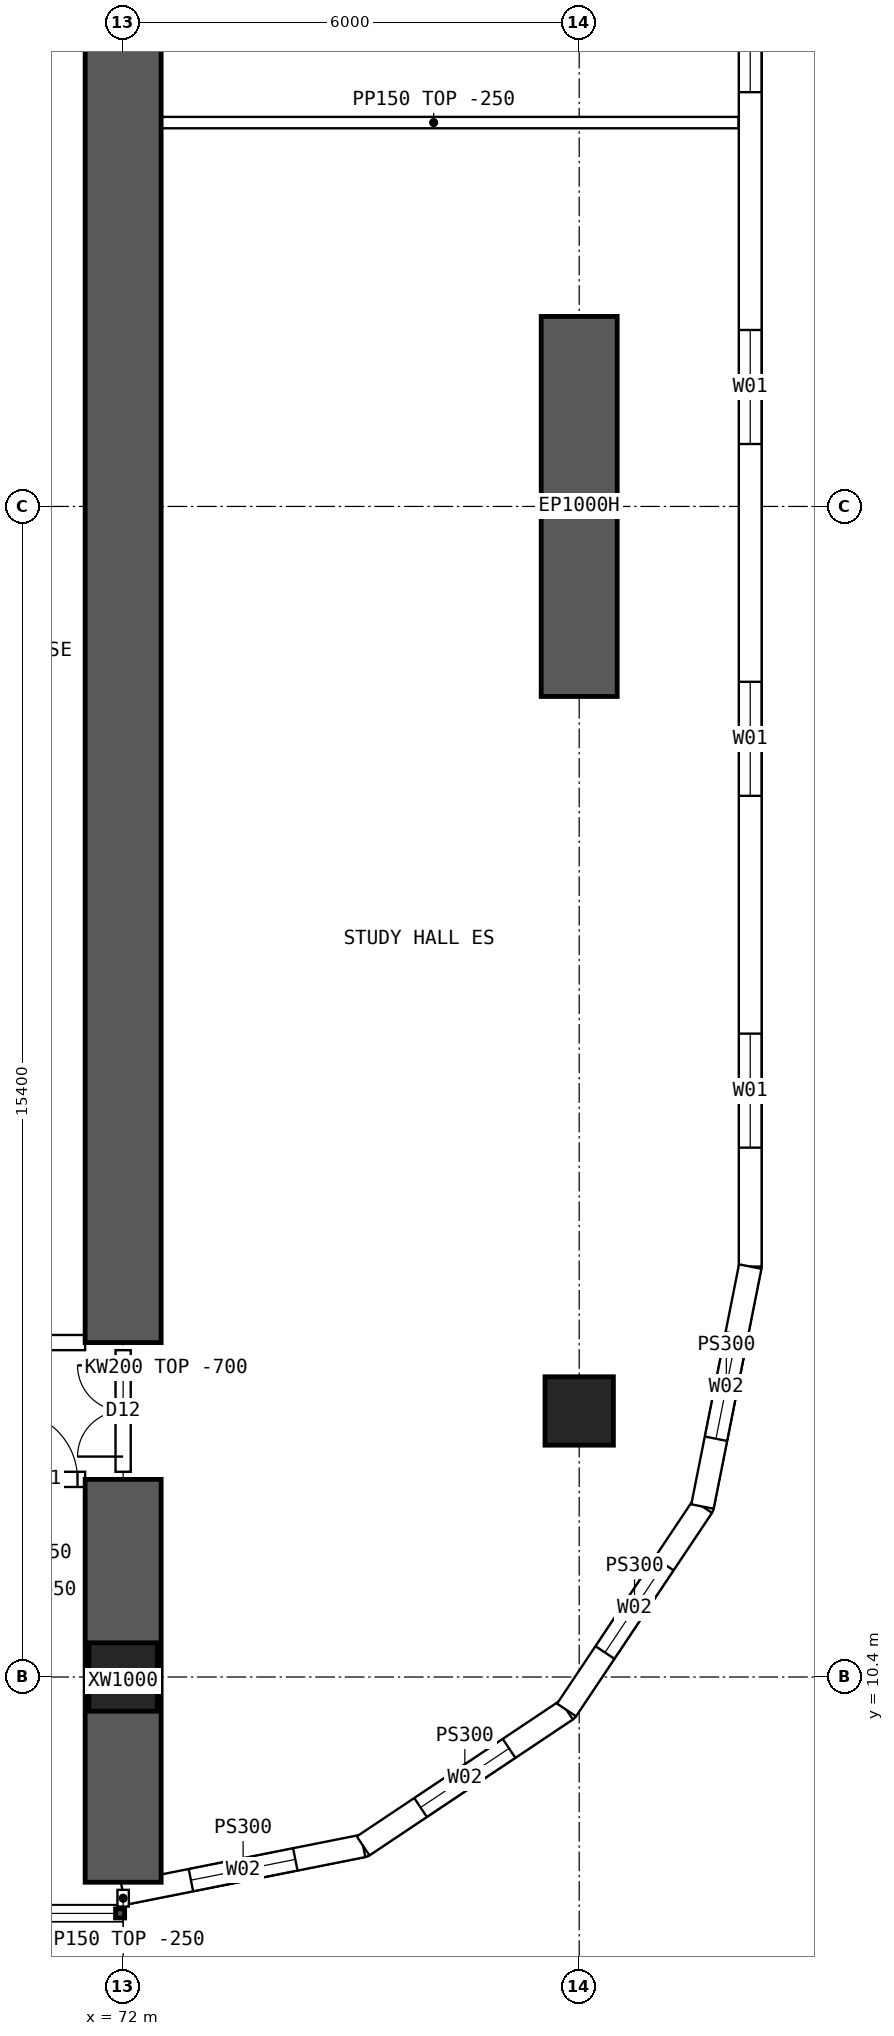
"""IFC4 building model, lengths in metres.
Left out: names, types, materials, properties, quantities, classifications, styles, units other than length and angle.
Written with IfcOpenShell. Run it as: python <this file> out.ifc"""

import sys

from ifc_helpers import new_model, si_unit, direction, frame, frame_2d, origin, origin_2d, place, context, subcontext, project, spatial, polyline, rectangle, hollow_rectangle, outline, extrude, element, fill, save


model = new_model("IFC4")
c1 = context("Model", 3, precision=1e-05, world=origin(), true_north=direction((0.0, 1.0)))
c2 = subcontext(c1, "Body", "Model", "MODEL_VIEW")
j1 = project(units=[si_unit("LENGTHUNIT", "METRE"), si_unit("PLANEANGLEUNIT", "RADIAN")], contexts=[c1])
p1 = place(None, origin())
s1 = spatial("IfcSite", under=j1, at=p1, CompositionType="ELEMENT")
p2 = place(p1, origin())
s2 = spatial("IfcBuilding", under=s1, at=p2, CompositionType="ELEMENT")
p3 = place(p2, frame((0.0, 0.0, 38.95)))
s3 = spatial("IfcBuildingStorey", under=s2, at=p3, CompositionType="ELEMENT", Elevation=38.95)
for number, where, z_axis, x_axis in (
    (1, (72.0, 10.4, 0.0), (0.0, 0.0, 1.0), (1.0, 0.0, 0.0)),
    (2, (78.0, 13.9, 0.0), (0.0, 0.0, 1.0), (1.0, 0.0, 0.0)),
):
    element("IfcColumn", number, at=place(p3, frame(where, z_axis=z_axis, x_axis=x_axis)), inside=s3, PredefinedType="COLUMN", context=c2, shape_type="SweptSolid", body=[
        extrude(hollow_rectangle(XDim=0.9, YDim=0.9, WallThickness=0.09, at=origin_2d()), origin(), (0.0, 0.0, 1.0), 3.75),
    ])
p4 = place(p3, frame((78.0, 23.3, 0.0), z_axis=(0.0, 0.0, 1.0), x_axis=(0.0, 1.0, 0.0)))
e3 = element("IfcWall", 3, at=p4, inside=s3, PredefinedType="SHEAR", context=c2, shape_type="SweptSolid", body=[
    extrude(rectangle(XDim=5.0, YDim=1.0, at=frame_2d((2.5, 0.0))), origin(), (0.0, 0.0, 1.0), 3.75),
])
p5 = place(p3, frame((72.0, 7.7, 0.0), z_axis=(0.0, 0.0, 1.0), x_axis=(0.0, 1.0, 0.0)))
e4 = element("IfcWall", 4, at=p5, inside=s3, PredefinedType="SHEAR", context=c2, shape_type="SweptSolid", body=[
    extrude(rectangle(XDim=5.3, YDim=1.0, at=frame_2d((2.65, 0.0))), origin(), (0.0, 0.0, 1.0), 3.75),
])
p6 = place(p3, frame((72.0, 14.8, 0.0), z_axis=(0.0, 0.0, 1.0), x_axis=(0.0, 1.0, 0.0)))
e5 = element("IfcWall", 5, at=p6, inside=s3, PredefinedType="SHEAR", context=c2, shape_type="SweptSolid", body=[
    extrude(rectangle(XDim=34.4, YDim=1.0, at=frame_2d((17.2, 0.0))), origin(), (0.0, 0.0, 1.0), 3.75),
])
p7 = place(p3, frame((80.25, 15.8, 0.0), z_axis=(0.0, 0.0, 1.0), x_axis=(0.0, 1.0, 0.0)))
e6 = element("IfcWall", 6, at=p7, inside=s3, PredefinedType="SOLIDWALL", context=c2, shape_type="SweptSolid", body=[
    extrude(outline(polyline([(-0.015, -0.15), (32.415, -0.15), (32.385, 0.15), (0.015, 0.15), (-0.015, -0.15)])), origin(), (0.0, 0.0, 1.0), 3.5),
])
p8 = place(p7, frame((1.564, 0.0, 0.9)))
e7 = element("IfcOpeningElement", 7, at=p8, cuts=e6, PredefinedType="OPENING", context=c2, shape_type="SweptSolid", body=[
    extrude(rectangle(XDim=1.5, YDim=2.0, at=frame_2d((0.75, 1.0))), frame((0.0, 0.16, 0.0), z_axis=(0.0, -1.0, 0.0), x_axis=(1.0, 0.0, 0.0)), (0.0, 0.0, 1.0), 0.32),
])
p9 = place(p7, frame((6.193, 0.0, 0.9)))
e8 = element("IfcOpeningElement", 8, at=p9, cuts=e6, PredefinedType="OPENING", context=c2, shape_type="SweptSolid", body=[
    extrude(rectangle(XDim=1.5, YDim=2.0, at=frame_2d((0.75, 1.0))), frame((0.0, 0.16, 0.0), z_axis=(0.0, -1.0, 0.0), x_axis=(1.0, 0.0, 0.0)), (0.0, 0.0, 1.0), 0.32),
])
p10 = place(p7, frame((10.822, 0.0, 0.9)))
e9 = element("IfcOpeningElement", 9, at=p10, cuts=e6, PredefinedType="OPENING", context=c2, shape_type="SweptSolid", body=[
    extrude(rectangle(XDim=1.5, YDim=2.0, at=frame_2d((0.75, 1.0))), frame((0.0, 0.16, 0.0), z_axis=(0.0, -1.0, 0.0), x_axis=(1.0, 0.0, 0.0)), (0.0, 0.0, 1.0), 0.32),
])
p11 = place(p7, frame((15.45, 0.0, 0.9)))
e10 = element("IfcOpeningElement", 10, at=p11, cuts=e6, PredefinedType="OPENING", context=c2, shape_type="SweptSolid", body=[
    extrude(rectangle(XDim=1.5, YDim=2.0, at=frame_2d((0.75, 1.0))), frame((0.0, 0.16, 0.0), z_axis=(0.0, -1.0, 0.0), x_axis=(1.0, 0.0, 0.0)), (0.0, 0.0, 1.0), 0.32),
])
p12 = place(p7, frame((20.079, 0.0, 0.9)))
e11 = element("IfcOpeningElement", 11, at=p12, cuts=e6, PredefinedType="OPENING", context=c2, shape_type="SweptSolid", body=[
    extrude(rectangle(XDim=1.5, YDim=2.0, at=frame_2d((0.75, 1.0))), frame((0.0, 0.16, 0.0), z_axis=(0.0, -1.0, 0.0), x_axis=(1.0, 0.0, 0.0)), (0.0, 0.0, 1.0), 0.32),
])
p13 = place(p7, frame((24.707, 0.0, 0.9)))
e12 = element("IfcOpeningElement", 12, at=p13, cuts=e6, PredefinedType="OPENING", context=c2, shape_type="SweptSolid", body=[
    extrude(rectangle(XDim=1.5, YDim=2.0, at=frame_2d((0.75, 1.0))), frame((0.0, 0.16, 0.0), z_axis=(0.0, -1.0, 0.0), x_axis=(1.0, 0.0, 0.0)), (0.0, 0.0, 1.0), 0.32),
])
p14 = place(p7, frame((29.336, 0.0, 0.9)))
e13 = element("IfcOpeningElement", 13, at=p14, cuts=e6, PredefinedType="OPENING", context=c2, shape_type="SweptSolid", body=[
    extrude(rectangle(XDim=1.5, YDim=2.0, at=frame_2d((0.75, 1.0))), frame((0.0, 0.16, 0.0), z_axis=(0.0, -1.0, 0.0), x_axis=(1.0, 0.0, 0.0)), (0.0, 0.0, 1.0), 0.32),
])
p15 = place(p3, frame((72.0, 7.55, 0.0), z_axis=(0.0, 0.0, 1.0), x_axis=(0.980787251524, 0.195080412259, 0.0)))
e14 = element("IfcWall", 14, at=p15, inside=s3, PredefinedType="SOLIDWALL", context=c2, shape_type="SweptSolid", body=[
    extrude(outline(polyline([(-0.03, -0.15), (3.249, -0.15), (3.189, 0.15), (0.03, 0.15), (-0.03, -0.15)])), origin(), (0.0, 0.0, 1.0), 3.5),
])
p16 = place(p15, frame((0.909, 0.0, 0.9)))
e15 = element("IfcOpeningElement", 15, at=p16, cuts=e14, PredefinedType="OPENING", context=c2, shape_type="SweptSolid", body=[
    extrude(rectangle(XDim=1.4, YDim=1.8, at=frame_2d((0.7, 0.9))), frame((0.0, 0.16, 0.0), z_axis=(0.0, -1.0, 0.0), x_axis=(1.0, 0.0, 0.0)), (0.0, 0.0, 1.0), 0.32),
])
p17 = place(p3, frame((75.157, 8.178, 0.0), z_axis=(0.0, 0.0, 1.0), x_axis=(0.831478105043, 0.555557522525, 0.0)))
e16 = element("IfcWall", 16, at=p17, inside=s3, PredefinedType="SOLIDWALL", context=c2, shape_type="SweptSolid", body=[
    extrude(outline(polyline([(-0.03, -0.15), (3.249, -0.15), (3.189, 0.15), (0.03, 0.15), (-0.03, -0.15)])), origin(), (0.0, 0.0, 1.0), 3.5),
])
p18 = place(p17, frame((0.909, 0.0, 0.9)))
e17 = element("IfcOpeningElement", 17, at=p18, cuts=e16, PredefinedType="OPENING", context=c2, shape_type="SweptSolid", body=[
    extrude(rectangle(XDim=1.4, YDim=1.8, at=frame_2d((0.7, 0.9))), frame((0.0, 0.16, 0.0), z_axis=(0.0, -1.0, 0.0), x_axis=(1.0, 0.0, 0.0)), (0.0, 0.0, 1.0), 0.32),
])
p19 = place(p3, frame((77.833, 9.966, 0.0), z_axis=(0.0, 0.0, 1.0), x_axis=(0.555609954424, 0.831443069936, 0.0)))
e18 = element("IfcWall", 18, at=p19, inside=s3, PredefinedType="SOLIDWALL", context=c2, shape_type="SweptSolid", body=[
    extrude(outline(polyline([(-0.03, -0.15), (3.249, -0.15), (3.189, 0.15), (0.03, 0.15), (-0.03, -0.15)])), origin(), (0.0, 0.0, 1.0), 3.5),
])
p20 = place(p19, frame((0.909, 0.0, 0.9)))
e19 = element("IfcOpeningElement", 19, at=p20, cuts=e18, PredefinedType="OPENING", context=c2, shape_type="SweptSolid", body=[
    extrude(rectangle(XDim=1.4, YDim=1.8, at=frame_2d((0.7, 0.9))), frame((0.0, 0.16, 0.0), z_axis=(0.0, -1.0, 0.0), x_axis=(1.0, 0.0, 0.0)), (0.0, 0.0, 1.0), 0.32),
])
p21 = place(p3, frame((79.622, 12.643, 0.0), z_axis=(0.0, 0.0, 1.0), x_axis=(0.195065901187, 0.980790137692, 0.0)))
e20 = element("IfcWall", 20, at=p21, inside=s3, PredefinedType="SOLIDWALL", context=c2, shape_type="SweptSolid", body=[
    extrude(outline(polyline([(-0.03, -0.15), (3.234, -0.15), (3.204, 0.15), (0.03, 0.15), (-0.03, -0.15)])), origin(), (0.0, 0.0, 1.0), 3.5),
])
p22 = place(p21, frame((0.909, 0.0, 0.9)))
e21 = element("IfcOpeningElement", 21, at=p22, cuts=e20, PredefinedType="OPENING", context=c2, shape_type="SweptSolid", body=[
    extrude(rectangle(XDim=1.4, YDim=1.8, at=frame_2d((0.7, 0.9))), frame((0.0, 0.16, 0.0), z_axis=(0.0, -1.0, 0.0), x_axis=(1.0, 0.0, 0.0)), (0.0, 0.0, 1.0), 0.32),
])
p23 = place(p3, frame((66.5, 13.0, 0.0), z_axis=(0.0, 0.0, 1.0), x_axis=(1.0, 0.0, 0.0)))
e22 = element("IfcWall", 22, at=p23, inside=s3, PredefinedType="SOLIDWALL", context=c2, shape_type="SweptSolid", body=[
    extrude(outline(polyline([(0.0, 0.0), (5.0, 0.0), (5.0, 3.1), (0.0, 3.1), (0.0, 0.0)])), frame((0.0, 0.1, 0.0), z_axis=(0.0, -1.0, 0.0), x_axis=(1.0, 0.0, 0.0)), (0.0, 0.0, 1.0), 0.2),
])
p24 = place(p23, frame((0.1, 0.0, 0.0)))
e23 = element("IfcOpeningElement", 23, at=p24, cuts=e22, PredefinedType="OPENING", context=c2, shape_type="SweptSolid", body=[
    extrude(rectangle(XDim=0.9, YDim=2.1, at=frame_2d((0.45, 1.05))), frame((0.0, 0.11, 0.0), z_axis=(0.0, -1.0, 0.0), x_axis=(1.0, 0.0, 0.0)), (0.0, 0.0, 1.0), 0.22),
])
p25 = place(p23, frame((4.0, 0.0, 0.0)))
e24 = element("IfcOpeningElement", 24, at=p25, cuts=e22, PredefinedType="OPENING", context=c2, shape_type="SweptSolid", body=[
    extrude(rectangle(XDim=0.9, YDim=2.1, at=frame_2d((0.45, 1.05))), frame((0.0, 0.11, 0.0), z_axis=(0.0, -1.0, 0.0), x_axis=(1.0, 0.0, 0.0)), (0.0, 0.0, 1.0), 0.22),
])
p26 = place(p3, frame((66.5, 14.8, 0.0), z_axis=(0.0, 0.0, 1.0), x_axis=(1.0, 0.0, 0.0)))
e25 = element("IfcWall", 25, at=p26, inside=s3, PredefinedType="SOLIDWALL", context=c2, shape_type="SweptSolid", body=[
    extrude(rectangle(XDim=5.0, YDim=0.2, at=frame_2d((2.5, 0.0))), origin(), (0.0, 0.0, 1.0), 3.5),
])
p27 = place(p26, frame((0.2, 0.0, 0.0)))
e26 = element("IfcOpeningElement", 26, at=p27, cuts=e25, PredefinedType="OPENING", context=c2, shape_type="SweptSolid", body=[
    extrude(rectangle(XDim=1.6, YDim=2.1, at=frame_2d((0.8, 1.05))), frame((0.0, 0.11, 0.0), z_axis=(0.0, -1.0, 0.0), x_axis=(1.0, 0.0, 0.0)), (0.0, 0.0, 1.0), 0.22),
])
p28 = place(p3, frame((72.075, 30.85, 0.0), z_axis=(0.0, 0.0, 1.0), x_axis=(1.0, 0.0, 0.0)))
e27 = element("IfcWall", 27, at=p28, inside=s3, PredefinedType="PARTITIONING", context=c2, shape_type="SweptSolid", body=[
    extrude(outline(polyline([(0.0, 0.0), (8.02, 0.0), (8.02, 3.5), (6.227, 3.5), (6.225, 3.05), (5.627, 3.05), (5.625, 3.5), (0.0, 3.5), (0.0, 0.0)])), frame((0.0, 0.075, 0.0), z_axis=(0.0, -1.0, 0.0), x_axis=(1.0, 0.0, 0.0)), (0.0, 0.0, 1.0), 0.15),
])
p29 = place(p3, frame((72.0, 13.1, 0.0), z_axis=(0.0, 0.0, 1.0), x_axis=(0.0, 1.0, 0.0)))
e28 = element("IfcWall", 28, at=p29, inside=s3, PredefinedType="SOLIDWALL", context=c2, shape_type="SweptSolid", body=[
    extrude(outline(polyline([(0.0, 0.0), (1.6, 0.0), (1.6, 3.05), (0.0, 3.05), (0.0, 0.0)])), frame((0.0, 0.1, 0.0), z_axis=(0.0, -1.0, 0.0), x_axis=(1.0, 0.0, 0.0)), (0.0, 0.0, 1.0), 0.2),
])
p30 = place(p29, frame((0.2, 0.0, 0.0)))
e29 = element("IfcOpeningElement", 29, at=p30, cuts=e28, PredefinedType="OPENING", context=c2, shape_type="SweptSolid", body=[
    extrude(rectangle(XDim=1.2, YDim=2.1, at=frame_2d((0.6, 1.05))), frame((0.0, 0.11, 0.0), z_axis=(0.0, -1.0, 0.0), x_axis=(1.0, 0.0, 0.0)), (0.0, 0.0, 1.0), 0.22),
])
p31 = place(p3, frame((72.0, 7.6, 0.0), z_axis=(0.0, 0.0, 1.0), x_axis=(0.0, -1.0, 0.0)))
e30 = element("IfcWall", 30, at=p31, inside=s3, PredefinedType="PARTITIONING", context=c2, shape_type="SweptSolid", body=[
    extrude(rectangle(XDim=0.22, YDim=0.15, at=frame_2d((0.11, 0.0))), origin(), (0.0, 0.0, 1.0), 3.5),
])
p32 = place(p8, origin())
e31 = element("IfcWindow", 31, at=p32, inside=s3, PartitioningType="SINGLE_PANEL", PredefinedType="WINDOW", context=c2, shape_type="SweptSolid", body=[
    extrude(rectangle(XDim=1.5, YDim=2.0, at=frame_2d((0.75, 1.0))), frame((0.0, 0.03, 0.0), z_axis=(0.0, -1.0, 0.0), x_axis=(1.0, 0.0, 0.0)), (0.0, 0.0, 1.0), 0.06),
])
fill(e7, e31)
p33 = place(p9, origin())
e32 = element("IfcWindow", 32, at=p33, inside=s3, PartitioningType="SINGLE_PANEL", PredefinedType="WINDOW", context=c2, shape_type="SweptSolid", body=[
    extrude(rectangle(XDim=1.5, YDim=2.0, at=frame_2d((0.75, 1.0))), frame((0.0, 0.03, 0.0), z_axis=(0.0, -1.0, 0.0), x_axis=(1.0, 0.0, 0.0)), (0.0, 0.0, 1.0), 0.06),
])
fill(e8, e32)
p34 = place(p10, origin())
e33 = element("IfcWindow", 33, at=p34, inside=s3, PartitioningType="SINGLE_PANEL", PredefinedType="WINDOW", context=c2, shape_type="SweptSolid", body=[
    extrude(rectangle(XDim=1.5, YDim=2.0, at=frame_2d((0.75, 1.0))), frame((0.0, 0.03, 0.0), z_axis=(0.0, -1.0, 0.0), x_axis=(1.0, 0.0, 0.0)), (0.0, 0.0, 1.0), 0.06),
])
fill(e9, e33)
p35 = place(p11, origin())
e34 = element("IfcWindow", 34, at=p35, inside=s3, PartitioningType="SINGLE_PANEL", PredefinedType="WINDOW", context=c2, shape_type="SweptSolid", body=[
    extrude(rectangle(XDim=1.5, YDim=2.0, at=frame_2d((0.75, 1.0))), frame((0.0, 0.03, 0.0), z_axis=(0.0, -1.0, 0.0), x_axis=(1.0, 0.0, 0.0)), (0.0, 0.0, 1.0), 0.06),
])
fill(e10, e34)
p36 = place(p16, origin())
e35 = element("IfcWindow", 35, at=p36, inside=s3, PartitioningType="SINGLE_PANEL", PredefinedType="WINDOW", context=c2, shape_type="SweptSolid", body=[
    extrude(rectangle(XDim=1.4, YDim=1.8, at=frame_2d((0.7, 0.9))), frame((0.0, 0.03, 0.0), z_axis=(0.0, -1.0, 0.0), x_axis=(1.0, 0.0, 0.0)), (0.0, 0.0, 1.0), 0.06),
])
fill(e15, e35)
p37 = place(p18, origin())
e36 = element("IfcWindow", 36, at=p37, inside=s3, PartitioningType="SINGLE_PANEL", PredefinedType="WINDOW", context=c2, shape_type="SweptSolid", body=[
    extrude(rectangle(XDim=1.4, YDim=1.8, at=frame_2d((0.7, 0.9))), frame((0.0, 0.03, 0.0), z_axis=(0.0, -1.0, 0.0), x_axis=(1.0, 0.0, 0.0)), (0.0, 0.0, 1.0), 0.06),
])
fill(e17, e36)
p38 = place(p20, origin())
e37 = element("IfcWindow", 37, at=p38, inside=s3, PartitioningType="SINGLE_PANEL", PredefinedType="WINDOW", context=c2, shape_type="SweptSolid", body=[
    extrude(rectangle(XDim=1.4, YDim=1.8, at=frame_2d((0.7, 0.9))), frame((0.0, 0.03, 0.0), z_axis=(0.0, -1.0, 0.0), x_axis=(1.0, 0.0, 0.0)), (0.0, 0.0, 1.0), 0.06),
])
fill(e19, e37)
p39 = place(p22, origin())
e38 = element("IfcWindow", 38, at=p39, inside=s3, PartitioningType="SINGLE_PANEL", PredefinedType="WINDOW", context=c2, shape_type="SweptSolid", body=[
    extrude(rectangle(XDim=1.4, YDim=1.8, at=frame_2d((0.7, 0.9))), frame((0.0, 0.03, 0.0), z_axis=(0.0, -1.0, 0.0), x_axis=(1.0, 0.0, 0.0)), (0.0, 0.0, 1.0), 0.06),
])
fill(e21, e38)
p40 = place(p25, origin())
e39 = element("IfcDoor", 39, at=p40, inside=s3, OperationType="SINGLE_SWING_LEFT", PredefinedType="DOOR", context=c2, shape_type="SweptSolid", body=[
    extrude(rectangle(XDim=0.9, YDim=2.1, at=frame_2d((0.45, 1.05))), frame((0.0, 0.025, 0.0), z_axis=(0.0, -1.0, 0.0), x_axis=(1.0, 0.0, 0.0)), (0.0, 0.0, 1.0), 0.05),
])
fill(e24, e39)
p41 = place(p30, origin())
e40 = element("IfcDoor", 40, at=p41, inside=s3, OperationType="DOUBLE_DOOR_SINGLE_SWING", PredefinedType="DOOR", context=c2, shape_type="SweptSolid", body=[
    extrude(rectangle(XDim=1.2, YDim=2.1, at=frame_2d((0.6, 1.05))), frame((0.0, 0.025, 0.0), z_axis=(0.0, -1.0, 0.0), x_axis=(1.0, 0.0, 0.0)), (0.0, 0.0, 1.0), 0.05),
])
fill(e29, e40)
save(model, sys.argv[1])
